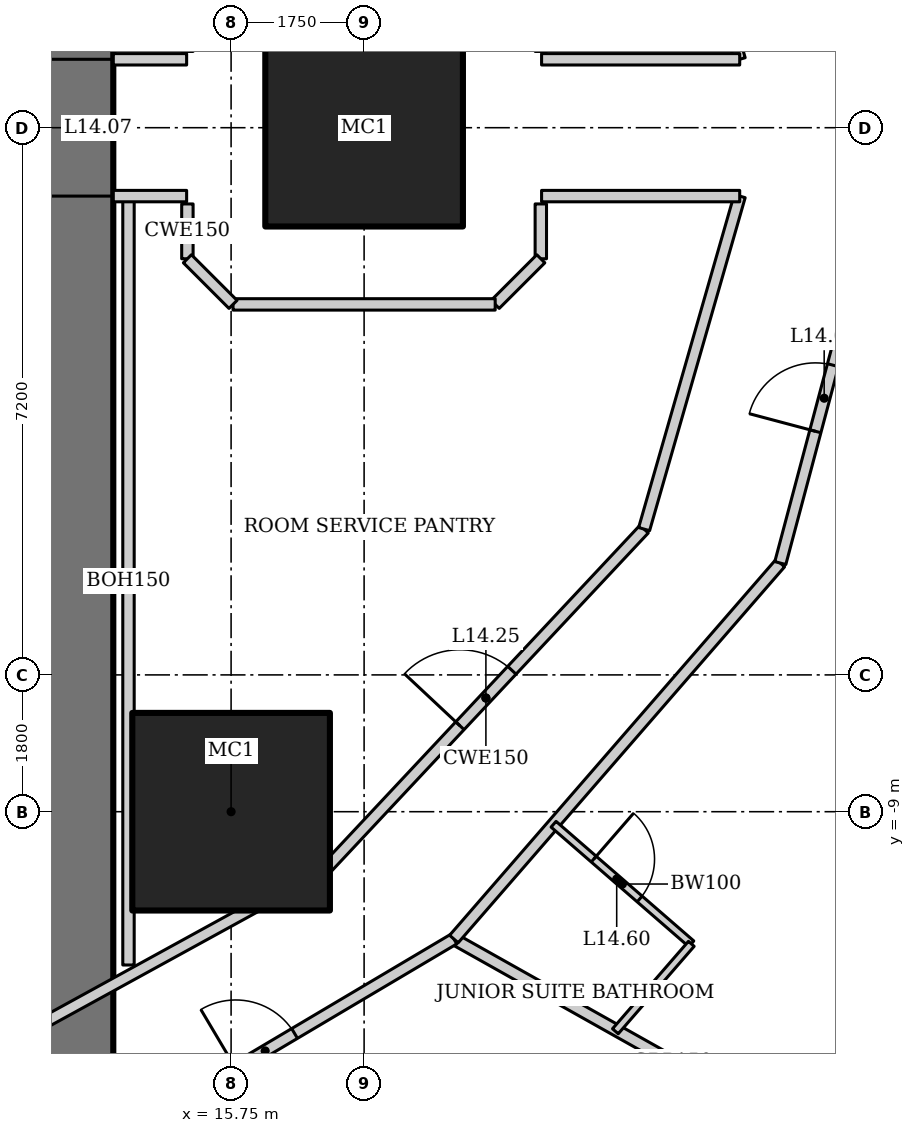
"""IFC4 building model, lengths in metres.
Left out: names, types, materials, properties, quantities, classifications, styles, units other than length and angle.
Written with IfcOpenShell. Run it as: python <this file> out.ifc"""

import sys

from ifc_helpers import new_model, si_unit, direction, frame, frame_2d, origin, origin_2d, place, context, subcontext, project, spatial, rectangle, hollow_rectangle, extrude, element, fill, save


model = new_model("IFC4")
c1 = context("Model", 3, precision=1e-05, world=origin(), true_north=direction((0.0, 1.0)))
c2 = subcontext(c1, "Body", "Model", "MODEL_VIEW")
j1 = project(units=[si_unit("LENGTHUNIT", "METRE"), si_unit("PLANEANGLEUNIT", "RADIAN")], contexts=[c1])
p1 = place(None, origin())
s1 = spatial("IfcSite", under=j1, at=p1, CompositionType="ELEMENT")
p2 = place(p1, origin())
s2 = spatial("IfcBuilding", under=s1, at=p2, CompositionType="ELEMENT")
p3 = place(p2, frame((0.0, 0.0, 65.8)))
s3 = spatial("IfcBuildingStorey", under=s2, at=p3, CompositionType="ELEMENT", Elevation=65.8)
for number, where, z_axis, x_axis in (
    (1, (17.5, 0.0, 0.0), (0.0, 0.0, 1.0), (1.0, 0.0, 0.0)),
    (2, (15.75, -9.0, 0.0), (0.0, 0.0, 1.0), (1.0, 0.0, 0.0)),
):
    element("IfcColumn", number, at=place(p3, frame(where, z_axis=z_axis, x_axis=x_axis)), inside=s3, PredefinedType="COLUMN", context=c2, shape_type="SweptSolid", body=[
        extrude(hollow_rectangle(XDim=2.6, YDim=2.6, WallThickness=0.13, at=origin_2d()), origin(), (0.0, 0.0, 1.0), 3.6),
    ])
p4 = place(p3, frame((13.2, -13.0, 0.0), z_axis=(0.0, 0.0, 1.0), x_axis=(0.0, 1.0, 0.0)))
e3 = element("IfcWall", 3, at=p4, inside=s3, PredefinedType="SHEAR", context=c2, shape_type="SweptSolid", body=[
    extrude(rectangle(XDim=26.0, YDim=2.0, at=frame_2d((13.0, 0.0))), origin(), (0.0, 0.0, 1.0), 3.6),
])
p5 = place(p4, frame((12.1, 0.0, 0.0)))
e4 = element("IfcOpeningElement", 4, at=p5, cuts=e3, PredefinedType="OPENING", context=c2, shape_type="SweptSolid", body=[
    extrude(rectangle(XDim=1.8, YDim=2.1, at=frame_2d((0.9, 1.05))), frame((0.0, 1.01, 0.0), z_axis=(0.0, -1.0, 0.0), x_axis=(1.0, 0.0, 0.0)), (0.0, 0.0, 1.0), 2.02),
])
p6 = place(p3, frame((24.435, -13.909, 0.0), z_axis=(0.0, 0.0, 1.0), x_axis=(-0.871747379892, 0.489955616001, 0.0)))
e5 = element("IfcWall", 5, at=p6, inside=s3, PredefinedType="PARTITIONING", context=c2, shape_type="SweptSolid", body=[
    extrude(rectangle(XDim=6.6, YDim=0.15, at=frame_2d((3.3, 0.0))), origin(), (0.0, 0.0, 1.0), 2.693),
])
p7 = place(p3, frame((24.5, 0.0, 0.0), z_axis=(0.0, 0.0, 1.0), x_axis=(-0.257083265334, 0.966389256296, 0.0)))
e6 = element("IfcWall", 6, at=p7, inside=s3, PredefinedType="PARTITIONING", context=c2, shape_type="SweptSolid", body=[
    extrude(rectangle(XDim=5.928, YDim=0.15, at=frame_2d((2.964, 0.0))), origin(), (0.0, 0.0, 1.0), 3.45),
])
p8 = place(p3, frame((13.357, -13.832, 0.0), z_axis=(0.0, 0.0, 1.0), x_axis=(0.860147339762, 0.510045639036, 0.0)))
e7 = element("IfcWall", 7, at=p8, inside=s3, PredefinedType="PARTITIONING", context=c2, shape_type="SweptSolid", body=[
    extrude(rectangle(XDim=6.19, YDim=0.15, at=frame_2d((3.095, 0.0))), origin(), (0.0, 0.0, 1.0), 3.45),
])
p9 = place(p8, frame((2.853, 0.0, 0.0)))
e8 = element("IfcOpeningElement", 8, at=p9, cuts=e7, PredefinedType="OPENING", context=c2, shape_type="SweptSolid", body=[
    extrude(rectangle(XDim=0.9, YDim=2.1, at=frame_2d((0.45, 1.05))), frame((0.0, 0.085, 0.0), z_axis=(0.0, -1.0, 0.0), x_axis=(1.0, 0.0, 0.0)), (0.0, 0.0, 1.0), 0.17),
])
p10 = place(p3, frame((18.681, -10.675, 0.0), z_axis=(0.0, 0.0, 1.0), x_axis=(0.655599989166, 0.755108372491, 0.0)))
e9 = element("IfcWall", 9, at=p10, inside=s3, PredefinedType="PARTITIONING", context=c2, shape_type="SweptSolid", body=[
    extrude(rectangle(XDim=6.551, YDim=0.15, at=frame_2d((3.275, 0.0))), origin(), (0.0, 0.0, 1.0), 3.45),
])
p11 = place(p3, frame((22.976, -5.729, 0.0), z_axis=(0.0, 0.0, 1.0), x_axis=(0.257083265334, 0.966389256296, 0.0)))
e10 = element("IfcWall", 10, at=p11, inside=s3, PredefinedType="PARTITIONING", context=c2, shape_type="SweptSolid", body=[
    extrude(rectangle(XDim=5.928, YDim=0.15, at=frame_2d((2.964, 0.0))), origin(), (0.0, 0.0, 1.0), 3.45),
])
p12 = place(p11, frame((1.794, 0.0, 0.0)))
e11 = element("IfcOpeningElement", 11, at=p12, cuts=e10, PredefinedType="OPENING", context=c2, shape_type="SweptSolid", body=[
    extrude(rectangle(XDim=0.9, YDim=2.1, at=frame_2d((0.45, 1.05))), frame((0.0, 0.085, 0.0), z_axis=(0.0, -1.0, 0.0), x_axis=(1.0, 0.0, 0.0)), (0.0, 0.0, 1.0), 0.17),
])
p13 = place(p3, frame((22.442, 0.9, 0.0), z_axis=(0.0, 0.0, 1.0), x_axis=(-0.27585972825, 0.961197903831, 0.0)))
e12 = element("IfcWall", 12, at=p13, inside=s3, PredefinedType="PARTITIONING", context=c2, shape_type="SweptSolid", body=[
    extrude(rectangle(XDim=4.559, YDim=0.15, at=frame_2d((2.279, 0.0))), origin(), (0.0, 0.0, 1.0), 3.45),
])
p14 = place(p3, frame((12.036, -12.464, 0.0), z_axis=(0.0, 0.0, 1.0), x_axis=(0.876522084062, 0.481361647986, 0.0)))
e13 = element("IfcWall", 13, at=p14, inside=s3, PredefinedType="PARTITIONING", context=c2, shape_type="SweptSolid", body=[
    extrude(rectangle(XDim=5.687, YDim=0.15, at=frame_2d((2.844, 0.0))), origin(), (0.0, 0.0, 1.0), 3.45),
])
p15 = place(p3, frame((17.021, -9.726, 0.0), z_axis=(0.0, 0.0, 1.0), x_axis=(0.68365836236, 0.729802194828, 0.0)))
e14 = element("IfcWall", 14, at=p15, inside=s3, PredefinedType="PARTITIONING", context=c2, shape_type="SweptSolid", body=[
    extrude(rectangle(XDim=6.09, YDim=0.15, at=frame_2d((3.045, 0.0))), origin(), (0.0, 0.0, 1.0), 3.45),
])
p16 = place(p15, frame((2.545, 0.0, 0.0)))
e15 = element("IfcOpeningElement", 15, at=p16, cuts=e14, PredefinedType="OPENING", context=c2, shape_type="SweptSolid", body=[
    extrude(rectangle(XDim=1.0, YDim=2.1, at=frame_2d((0.5, 1.05))), frame((0.0, 0.085, 0.0), z_axis=(0.0, -1.0, 0.0), x_axis=(1.0, 0.0, 0.0)), (0.0, 0.0, 1.0), 0.17),
])
p17 = place(p3, frame((21.184, -5.282, 0.0), z_axis=(0.0, 0.0, 1.0), x_axis=(0.27585972825, 0.961197903831, 0.0)))
e16 = element("IfcWall", 16, at=p17, inside=s3, PredefinedType="PARTITIONING", context=c2, shape_type="SweptSolid", body=[
    extrude(rectangle(XDim=4.559, YDim=0.15, at=frame_2d((2.279, 0.0))), origin(), (0.0, 0.0, 1.0), 3.45),
])
p18 = place(p3, frame((14.4, -11.017, 0.0), z_axis=(0.0, 0.0, 1.0), x_axis=(0.0, 1.0, 0.0)))
e17 = element("IfcWall", 17, at=p18, inside=s3, PredefinedType="PARTITIONING", context=c2, shape_type="SweptSolid", body=[
    extrude(rectangle(XDim=10.117, YDim=0.15, at=frame_2d((5.059, 0.0))), origin(), (0.0, 0.0, 1.0), 3.45),
])
p19 = place(p3, frame((19.993, -9.165, 0.0), z_axis=(0.0, 0.0, 1.0), x_axis=(0.755098052661, -0.655611875172, 0.0)))
e18 = element("IfcWall", 18, at=p19, inside=s3, PredefinedType="PARTITIONING", context=c2, shape_type="SweptSolid", body=[
    extrude(rectangle(XDim=2.4, YDim=0.1, at=frame_2d((1.2, 0.0))), origin(), (0.0, 0.0, 1.0), 3.45),
])
p20 = place(p19, frame((0.7, 0.0, 0.0)))
e19 = element("IfcOpeningElement", 19, at=p20, cuts=e18, PredefinedType="OPENING", context=c2, shape_type="SweptSolid", body=[
    extrude(rectangle(XDim=0.8, YDim=2.1, at=frame_2d((0.4, 1.05))), frame((0.0, 0.06, 0.0), z_axis=(0.0, -1.0, 0.0), x_axis=(1.0, 0.0, 0.0)), (0.0, 0.0, 1.0), 0.12),
])
p21 = place(p3, frame((21.805, -10.738, 0.0), z_axis=(0.0, 0.0, 1.0), x_axis=(-0.655528024617, -0.755170847518, 0.0)))
e20 = element("IfcWall", 20, at=p21, inside=s3, PredefinedType="PARTITIONING", context=c2, shape_type="SweptSolid", body=[
    extrude(rectangle(XDim=1.524, YDim=0.1, at=frame_2d((0.762, 0.0))), origin(), (0.0, 0.0, 1.0), 3.45),
])
p22 = place(p3, frame((14.2, -0.9, 0.0), z_axis=(0.0, 0.0, 1.0), x_axis=(1.0, 0.0, 0.0)))
e21 = element("IfcWall", 21, at=p22, inside=s3, PredefinedType="PARTITIONING", context=c2, shape_type="SweptSolid", body=[
    extrude(rectangle(XDim=0.965, YDim=0.15, at=frame_2d((0.482, 0.0))), origin(), (0.0, 0.0, 1.0), 3.45),
])
p23 = place(p3, frame((19.835, -0.9, 0.0), z_axis=(0.0, 0.0, 1.0), x_axis=(1.0, 0.0, 0.0)))
e22 = element("IfcWall", 22, at=p23, inside=s3, PredefinedType="PARTITIONING", context=c2, shape_type="SweptSolid", body=[
    extrude(rectangle(XDim=2.607, YDim=0.15, at=frame_2d((1.303, 0.0))), origin(), (0.0, 0.0, 1.0), 3.45),
])
p24 = place(p3, frame((14.2, 0.9, 0.0), z_axis=(0.0, 0.0, 1.0), x_axis=(1.0, 0.0, 0.0)))
e23 = element("IfcWall", 23, at=p24, inside=s3, PredefinedType="PARTITIONING", context=c2, shape_type="SweptSolid", body=[
    extrude(rectangle(XDim=0.965, YDim=0.15, at=frame_2d((0.482, 0.0))), origin(), (0.0, 0.0, 1.0), 3.45),
])
p25 = place(p3, frame((19.835, 0.9, 0.0), z_axis=(0.0, 0.0, 1.0), x_axis=(1.0, 0.0, 0.0)))
e24 = element("IfcWall", 24, at=p25, inside=s3, PredefinedType="PARTITIONING", context=c2, shape_type="SweptSolid", body=[
    extrude(rectangle(XDim=2.607, YDim=0.15, at=frame_2d((1.303, 0.0))), origin(), (0.0, 0.0, 1.0), 3.45),
])
for number, where, z_axis, x_axis in (
    (25, (15.175, -1.725, 0.0), (0.0, 0.0, 1.0), (0.0, 1.0, 0.0)),
    (26, (19.825, -1.003, 0.0), (0.0, 0.0, 1.0), (0.0, -1.0, 0.0)),
):
    element("IfcWall", number, at=place(p3, frame(where, z_axis=z_axis, x_axis=x_axis)), inside=s3, PredefinedType="PARTITIONING", context=c2, shape_type="SweptSolid", body=[
        extrude(rectangle(XDim=0.721, YDim=0.15, at=frame_2d((0.361, 0.0))), origin(), (0.0, 0.0, 1.0), 3.45),
    ])
p26 = place(p3, frame((19.825, -1.725, 0.0), z_axis=(0.0, 0.0, 1.0), x_axis=(-0.707106781187, -0.707106781187, 0.0)))
e27 = element("IfcWall", 27, at=p26, inside=s3, PredefinedType="PARTITIONING", context=c2, shape_type="SweptSolid", body=[
    extrude(rectangle(XDim=0.849, YDim=0.15, at=frame_2d((0.425, 0.0))), origin(), (0.0, 0.0, 1.0), 3.45),
])
p27 = place(p3, frame((19.225, -2.325, 0.0), z_axis=(0.0, 0.0, 1.0), x_axis=(-1.0, 0.0, 0.0)))
e28 = element("IfcWall", 28, at=p27, inside=s3, PredefinedType="PARTITIONING", context=c2, shape_type="SweptSolid", body=[
    extrude(rectangle(XDim=3.449, YDim=0.15, at=frame_2d((1.725, 0.0))), origin(), (0.0, 0.0, 1.0), 3.45),
])
p28 = place(p3, frame((15.775, -2.325, 0.0), z_axis=(0.0, 0.0, 1.0), x_axis=(-0.707106781187, 0.707106781187, 0.0)))
e29 = element("IfcWall", 29, at=p28, inside=s3, PredefinedType="PARTITIONING", context=c2, shape_type="SweptSolid", body=[
    extrude(rectangle(XDim=0.849, YDim=0.15, at=frame_2d((0.425, 0.0))), origin(), (0.0, 0.0, 1.0), 3.45),
])
p29 = place(p16, origin())
e30 = element("IfcDoor", 30, at=p29, inside=s3, OperationType="SINGLE_SWING_LEFT", PredefinedType="DOOR", context=c2, shape_type="SweptSolid", body=[
    extrude(rectangle(XDim=1.0, YDim=2.1, at=frame_2d((0.5, 1.05))), frame((0.0, 0.025, 0.0), z_axis=(0.0, -1.0, 0.0), x_axis=(1.0, 0.0, 0.0)), (0.0, 0.0, 1.0), 0.05),
])
fill(e15, e30)
p30 = place(p9, origin())
e31 = element("IfcDoor", 31, at=p30, inside=s3, OperationType="SINGLE_SWING_LEFT", PredefinedType="DOOR", context=c2, shape_type="SweptSolid", body=[
    extrude(rectangle(XDim=0.9, YDim=2.1, at=frame_2d((0.45, 1.05))), frame((0.0, 0.025, 0.0), z_axis=(0.0, -1.0, 0.0), x_axis=(1.0, 0.0, 0.0)), (0.0, 0.0, 1.0), 0.05),
])
fill(e8, e31)
p31 = place(p20, origin())
e32 = element("IfcDoor", 32, at=p31, inside=s3, OperationType="SINGLE_SWING_LEFT", PredefinedType="DOOR", context=c2, shape_type="SweptSolid", body=[
    extrude(rectangle(XDim=0.8, YDim=2.1, at=frame_2d((0.4, 1.05))), frame((0.0, 0.025, 0.0), z_axis=(0.0, -1.0, 0.0), x_axis=(1.0, 0.0, 0.0)), (0.0, 0.0, 1.0), 0.05),
])
fill(e19, e32)
p32 = place(p12, origin())
e33 = element("IfcDoor", 33, at=p32, inside=s3, OperationType="SINGLE_SWING_LEFT", PredefinedType="DOOR", context=c2, shape_type="SweptSolid", body=[
    extrude(rectangle(XDim=0.9, YDim=2.1, at=frame_2d((0.45, 1.05))), frame((0.0, 0.025, 0.0), z_axis=(0.0, -1.0, 0.0), x_axis=(1.0, 0.0, 0.0)), (0.0, 0.0, 1.0), 0.05),
])
fill(e11, e33)
save(model, sys.argv[1])
